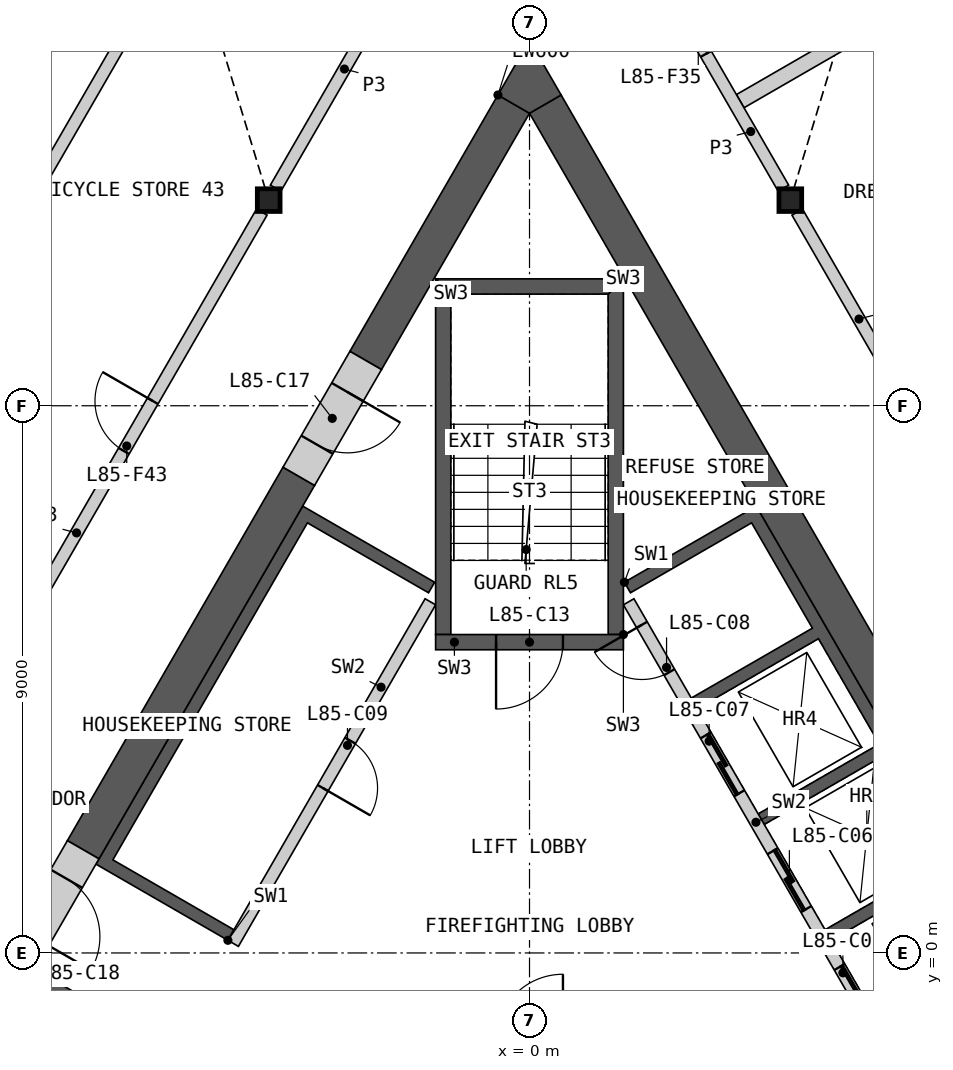
"""IFC4 building model, lengths in metres.
Left out: names, types, materials, properties, quantities, classifications, styles, units other than length and angle.
Written with IfcOpenShell. Run it as: python <this file> out.ifc"""

import sys

from ifc_helpers import new_model, si_unit, direction, frame, frame_2d, origin, origin_2d, place, context, subcontext, project, spatial, polyline, rectangle, i_section, outline, extrude, element, fill, save


model = new_model("IFC4")
c1 = context("Model", 3, precision=1e-05, world=origin(), true_north=direction((0.0, 1.0)))
c2 = subcontext(c1, "Body", "Model", "MODEL_VIEW")
j1 = project(units=[si_unit("LENGTHUNIT", "METRE"), si_unit("PLANEANGLEUNIT", "RADIAN")], contexts=[c1])
p1 = place(None, origin())
s1 = spatial("IfcSite", under=j1, at=p1, CompositionType="ELEMENT")
p2 = place(p1, origin())
s2 = spatial("IfcBuilding", under=s1, at=p2, CompositionType="ELEMENT")
p3 = place(p2, frame((0.0, 0.0, 378.0)))
s3 = spatial("IfcBuildingStorey", under=s2, at=p3, CompositionType="ELEMENT", Elevation=378.0)
for number, where, z_axis, x_axis in (
    (1, (-4.289, 12.382, 0.0), (0.0, 0.0, 1.0), (1.0, 0.0, 0.0)),
    (2, (4.289, 12.382, 0.0), (0.0, 0.0, 1.0), (1.0, 0.0, 0.0)),
):
    element("IfcColumn", number, at=place(p3, frame(where, z_axis=z_axis, x_axis=x_axis)), inside=s3, PredefinedType="COLUMN", context=c2, shape_type="SweptSolid", body=[
        extrude(i_section(OverallWidth=0.374, OverallDepth=0.372, WebThickness=0.016, FlangeThickness=0.026, at=origin_2d()), origin(), (0.0, 0.0, 1.0), 3.4),
    ])
p4 = place(p3, origin())
e3 = element("IfcWall", 3, at=p4, inside=s3, PredefinedType="SHEAR", context=c2, shape_type="SweptSolid", body=[
    extrude(outline(polyline([(1.561, 6.097), (3.731, 7.35), (8.231, -0.444), (6.061, -1.697), (5.96, -1.524), (7.952, -0.374), (6.952, 1.358), (4.96, 0.208), (4.861, 0.381), (6.852, 1.531), (5.852, 3.263), (3.861, 2.113), (3.76, 2.287), (5.752, 3.437), (4.752, 5.169), (2.76, 4.019), (2.66, 4.192), (4.652, 5.342), (3.652, 7.074), (1.66, 5.924), (1.561, 6.097)])), origin(), (0.0, 0.0, 1.0), 3.1),
])
p5 = place(p3, frame((5.817, -1.476, 0.0), z_axis=(0.0, 0.0, 1.0), x_axis=(-0.500002616675, 0.866023893041, 0.0)))
e4 = element("IfcWall", 4, at=p5, inside=s3, PredefinedType="SOLIDWALL", context=c2, shape_type="SweptSolid", body=[
    extrude(rectangle(XDim=8.373, YDim=0.2, at=frame_2d((4.187, 0.0))), origin(), (0.0, 0.0, 1.0), 3.1),
])
p6 = place(p5, frame((0.337, 0.0, 0.0)))
e5 = element("IfcOpeningElement", 5, at=p6, cuts=e4, PredefinedType="OPENING", context=c2, shape_type="SweptSolid", body=[
    extrude(rectangle(XDim=1.1, YDim=2.1, at=frame_2d((0.55, 1.05))), frame((0.0, 0.11, 0.0), z_axis=(0.0, -1.0, 0.0), x_axis=(1.0, 0.0, 0.0)), (0.0, 0.0, 1.0), 0.22),
])
p7 = place(p5, frame((2.537, 0.0, 0.0)))
e6 = element("IfcOpeningElement", 6, at=p7, cuts=e4, PredefinedType="OPENING", context=c2, shape_type="SweptSolid", body=[
    extrude(rectangle(XDim=1.1, YDim=2.1, at=frame_2d((0.55, 1.05))), frame((0.0, 0.11, 0.0), z_axis=(0.0, -1.0, 0.0), x_axis=(1.0, 0.0, 0.0)), (0.0, 0.0, 1.0), 0.22),
])
p8 = place(p5, frame((4.737, 0.0, 0.0)))
e7 = element("IfcOpeningElement", 7, at=p8, cuts=e4, PredefinedType="OPENING", context=c2, shape_type="SweptSolid", body=[
    extrude(rectangle(XDim=1.1, YDim=2.1, at=frame_2d((0.55, 1.05))), frame((0.0, 0.11, 0.0), z_axis=(0.0, -1.0, 0.0), x_axis=(1.0, 0.0, 0.0)), (0.0, 0.0, 1.0), 0.22),
])
p9 = place(p5, frame((7.037, 0.0, 0.0)))
e8 = element("IfcOpeningElement", 8, at=p9, cuts=e4, PredefinedType="OPENING", context=c2, shape_type="SweptSolid", body=[
    extrude(rectangle(XDim=0.9, YDim=2.1, at=frame_2d((0.45, 1.05))), frame((0.0, 0.11, 0.0), z_axis=(0.0, -1.0, 0.0), x_axis=(1.0, 0.0, 0.0)), (0.0, 0.0, 1.0), 0.22),
])
p10 = place(p3, origin())
e9 = element("IfcWall", 9, at=p10, inside=s3, PredefinedType="SHEAR", context=c2, shape_type="SweptSolid", body=[
    extrude(outline(polyline([(-6.061, -1.697), (-8.231, -0.444), (-8.131, -0.271), (-5.96, -1.524), (-6.061, -1.697)])), origin(), (0.0, 0.0, 1.0), 3.1),
])
p11 = place(p3, origin())
e10 = element("IfcWall", 10, at=p11, inside=s3, PredefinedType="SHEAR", context=c2, shape_type="SweptSolid", body=[
    extrude(outline(polyline([(-4.96, 0.208), (-7.131, 1.461), (-3.731, 7.35), (-1.561, 6.097), (-1.66, 5.924), (-3.652, 7.074), (-6.852, 1.531), (-4.861, 0.381), (-4.96, 0.208)])), origin(), (0.0, 0.0, 1.0), 3.1),
])
p12 = place(p3, frame((-1.631, 5.776, 0.0), z_axis=(0.0, 0.0, 1.0), x_axis=(-0.499992876559, -0.866029516466, 0.0)))
e11 = element("IfcWall", 11, at=p12, inside=s3, PredefinedType="SOLIDWALL", context=c2, shape_type="SweptSolid", body=[
    extrude(rectangle(XDim=6.486, YDim=0.2, at=frame_2d((3.243, 0.0))), origin(), (0.0, 0.0, 1.0), 3.1),
])
p13 = place(p12, frame((2.637, 0.0, 0.0)))
e12 = element("IfcOpeningElement", 12, at=p13, cuts=e11, PredefinedType="OPENING", context=c2, shape_type="SweptSolid", body=[
    extrude(rectangle(XDim=0.9, YDim=2.1, at=frame_2d((0.45, 1.05))), frame((0.0, 0.11, 0.0), z_axis=(0.0, -1.0, 0.0), x_axis=(1.0, 0.0, 0.0)), (0.0, 0.0, 1.0), 0.22),
])
p14 = place(p3, origin())
e13 = element("IfcWall", 13, at=p14, inside=s3, PredefinedType="SHEAR", context=c2, shape_type="SweptSolid", body=[
    extrude(outline(polyline([(1.544, 5.237), (1.544, 11.087), (1.294, 10.837), (1.294, 5.237), (1.544, 5.237)])), origin(), (0.0, 0.0, 1.0), 3.1),
])
p15 = place(p3, origin())
e14 = element("IfcWall", 14, at=p15, inside=s3, PredefinedType="SHEAR", context=c2, shape_type="SweptSolid", body=[
    extrude(outline(polyline([(1.544, 11.087), (-1.544, 11.087), (-1.294, 10.837), (1.294, 10.837), (1.544, 11.087)])), origin(), (0.0, 0.0, 1.0), 3.1),
])
p16 = place(p3, origin())
e15 = element("IfcWall", 15, at=p16, inside=s3, PredefinedType="SHEAR", context=c2, shape_type="SweptSolid", body=[
    extrude(outline(polyline([(-1.294, 10.837), (-1.544, 11.087), (-1.544, 5.237), (-1.294, 5.237), (-1.294, 10.837)])), origin(), (0.0, 0.0, 1.0), 3.1),
])
p17 = place(p3, frame((1.544, 5.112, 0.0), z_axis=(0.0, 0.0, 1.0), x_axis=(-1.0, 0.0, 0.0)))
e16 = element("IfcWall", 16, at=p17, inside=s3, PredefinedType="SHEAR", context=c2, shape_type="SweptSolid", body=[
    extrude(rectangle(XDim=3.088, YDim=0.25, at=frame_2d((1.544, 0.0))), origin(), (0.0, 0.0, 1.0), 3.1),
])
p18 = place(p17, frame((0.994, 0.0, 0.0)))
e17 = element("IfcOpeningElement", 17, at=p18, cuts=e16, PredefinedType="OPENING", context=c2, shape_type="SweptSolid", body=[
    extrude(rectangle(XDim=1.1, YDim=2.1, at=frame_2d((0.55, 1.05))), frame((0.0, 0.135, 0.0), z_axis=(0.0, -1.0, 0.0), x_axis=(1.0, 0.0, 0.0)), (0.0, 0.0, 1.0), 0.27),
])
p19 = place(p3, frame((8.686, -0.634, 0.0), z_axis=(0.0, 0.0, 1.0), x_axis=(-0.500004601921, 0.866022746848, 0.0)))
e18 = element("IfcWall", 18, at=p19, inside=s3, PredefinedType="SHEAR", context=c2, shape_type="SweptSolid", body=[
    extrude(rectangle(XDim=16.853, YDim=0.6, at=frame_2d((8.426, 0.0))), origin(), (0.0, 0.0, 1.0), 3.1),
])
p20 = place(p3, frame((-3.794, 7.84, 0.0), z_axis=(0.0, 0.0, 1.0), x_axis=(-0.499974747889, -0.866039982607, 0.0)))
e19 = element("IfcWall", 19, at=p20, inside=s3, PredefinedType="SHEAR", context=c2, shape_type="SweptSolid", body=[
    extrude(rectangle(XDim=7.092, YDim=0.6, at=frame_2d((3.546, 0.0))), origin(), (0.0, 0.0, 1.0), 3.1),
])
p21 = place(p3, frame((-0.26, 13.961, 0.0), z_axis=(0.0, 0.0, 1.0), x_axis=(-0.50000604952, -0.866021911064, 0.0)))
e20 = element("IfcWall", 20, at=p21, inside=s3, PredefinedType="SHEAR", context=c2, shape_type="SweptSolid", body=[
    extrude(rectangle(XDim=4.869, YDim=0.6, at=frame_2d((2.434, 0.0))), origin(), (0.0, 0.0, 1.0), 3.1),
])
p22 = place(p3, origin())
e21 = element("IfcWall", 21, at=p22, inside=s3, PredefinedType="SHEAR", context=c2, shape_type="SweptSolid", body=[
    extrude(outline(polyline([(-0.52, 14.111), (0.0, 15.011), (0.52, 14.111), (0.0, 13.811), (-0.52, 14.111)])), origin(), (0.0, 0.0, 1.0), 3.1),
])
p23 = place(p3, frame((-2.694, 9.745, 0.0), z_axis=(0.0, 0.0, 1.0), x_axis=(-0.50002983664, -0.866008176907, 0.0)))
e22 = element("IfcWall", 22, at=p23, inside=s3, PredefinedType="SHEAR", context=c2, shape_type="SweptSolid", body=[
    extrude(rectangle(XDim=2.2, YDim=0.6, at=frame_2d((1.1, 0.0))), origin(), (0.0, 0.0, 1.0), 3.1),
])
p24 = place(p23, frame((0.6, 0.0, 0.0)))
e23 = element("IfcOpeningElement", 23, at=p24, cuts=e22, PredefinedType="OPENING", context=c2, shape_type="SweptSolid", body=[
    extrude(rectangle(XDim=1.0, YDim=2.1, at=frame_2d((0.5, 1.05))), frame((0.0, 0.31, 0.0), z_axis=(0.0, -1.0, 0.0), x_axis=(1.0, 0.0, 0.0)), (0.0, 0.0, 1.0), 0.62),
])
p25 = place(p3, frame((-7.34, 1.698, 0.0), z_axis=(0.0, 0.0, 1.0), x_axis=(-0.50002983664, -0.866008176907, 0.0)))
e24 = element("IfcWall", 24, at=p25, inside=s3, PredefinedType="SHEAR", context=c2, shape_type="SweptSolid", body=[
    extrude(rectangle(XDim=2.2, YDim=0.6, at=frame_2d((1.1, 0.0))), origin(), (0.0, 0.0, 1.0), 3.1),
])
p26 = place(p25, frame((0.55, 0.0, 0.0)))
e25 = element("IfcOpeningElement", 25, at=p26, cuts=e24, PredefinedType="OPENING", context=c2, shape_type="SweptSolid", body=[
    extrude(rectangle(XDim=1.1, YDim=2.1, at=frame_2d((0.55, 1.05))), frame((0.0, 0.31, 0.0), z_axis=(0.0, -1.0, 0.0), x_axis=(1.0, 0.0, 0.0)), (0.0, 0.0, 1.0), 0.62),
])
p27 = place(p3, frame((3.465, 14.01, 0.0), z_axis=(0.0, 0.0, 1.0), x_axis=(0.866032376801, 0.499987922186, 0.0)))
e26 = element("IfcWall", 26, at=p27, inside=s3, PredefinedType="PARTITIONING", context=c2, shape_type="SweptSolid", body=[
    extrude(rectangle(XDim=11.782, YDim=0.25, at=frame_2d((5.891, 0.0))), origin(), (0.0, 0.0, 1.0), 2.33),
])
p28 = place(p3, frame((4.403, 12.185, 0.0), z_axis=(0.0, 0.0, 1.0), x_axis=(0.499992155518, -0.866029932751, 0.0)))
e27 = element("IfcWall", 27, at=p28, inside=s3, PredefinedType="PARTITIONING", context=c2, shape_type="SweptSolid", body=[
    extrude(rectangle(XDim=8.123, YDim=0.2, at=frame_2d((4.062, 0.0))), origin(), (0.0, 0.0, 1.0), 3.1),
])
p29 = place(p28, frame((3.963, 0.0, 0.0)))
e28 = element("IfcOpeningElement", 28, at=p29, cuts=e27, PredefinedType="OPENING", context=c2, shape_type="SweptSolid", body=[
    extrude(rectangle(XDim=1.0, YDim=2.1, at=frame_2d((0.5, 1.05))), frame((0.0, 0.11, 0.0), z_axis=(0.0, -1.0, 0.0), x_axis=(1.0, 0.0, 0.0)), (0.0, 0.0, 1.0), 0.22),
])
p30 = place(p3, frame((-8.465, 5.15, 0.0), z_axis=(0.0, 0.0, 1.0), x_axis=(0.499992155518, 0.866029932751, 0.0)))
e29 = element("IfcWall", 29, at=p30, inside=s3, PredefinedType="PARTITIONING", context=c2, shape_type="SweptSolid", body=[
    extrude(rectangle(XDim=8.123, YDim=0.2, at=frame_2d((4.062, 0.0))), origin(), (0.0, 0.0, 1.0), 3.1),
])
p31 = place(p30, frame((3.587, 0.0, 0.0)))
e30 = element("IfcOpeningElement", 30, at=p31, cuts=e29, PredefinedType="OPENING", context=c2, shape_type="SweptSolid", body=[
    extrude(rectangle(XDim=0.95, YDim=2.1, at=frame_2d((0.475, 1.05))), frame((0.0, 0.11, 0.0), z_axis=(0.0, -1.0, 0.0), x_axis=(1.0, 0.0, 0.0)), (0.0, 0.0, 1.0), 0.22),
])
p32 = place(p3, frame((-4.176, 12.579, 0.0), z_axis=(0.0, 0.0, 1.0), x_axis=(0.499974648164, 0.866040040179, 0.0)))
e31 = element("IfcWall", 31, at=p32, inside=s3, PredefinedType="PARTITIONING", context=c2, shape_type="SweptSolid", body=[
    extrude(rectangle(XDim=4.525, YDim=0.2, at=frame_2d((2.263, 0.0))), origin(), (0.0, 0.0, 1.0), 3.1),
])
p33 = place(p3, frame((2.025, 16.303, 0.0), z_axis=(0.0, 0.0, 1.0), x_axis=(0.500004215162, -0.866022970146, 0.0)))
e32 = element("IfcWall", 32, at=p33, inside=s3, PredefinedType="PARTITIONING", context=c2, shape_type="SweptSolid", body=[
    extrude(rectangle(XDim=4.3, YDim=0.2, at=frame_2d((2.15, 0.0))), origin(), (0.0, 0.0, 1.0), 3.1),
])
p34 = place(p33, frame((0.75, 0.0, 0.0)))
e33 = element("IfcOpeningElement", 33, at=p34, cuts=e32, PredefinedType="OPENING", context=c2, shape_type="SweptSolid", body=[
    extrude(rectangle(XDim=1.0, YDim=2.1, at=frame_2d((0.5, 1.05))), frame((0.0, 0.11, 0.0), z_axis=(0.0, -1.0, 0.0), x_axis=(1.0, 0.0, 0.0)), (0.0, 0.0, 1.0), 0.22),
])
p35 = place(p3, frame((-11.473, 6.74, 0.0), z_axis=(0.0, 0.0, 1.0), x_axis=(0.500001082559, 0.866024778768, 0.0)))
e34 = element("IfcWall", 34, at=p35, inside=s3, PredefinedType="PARTITIONING", context=c2, shape_type="SweptSolid", body=[
    extrude(rectangle(XDim=15.094, YDim=0.2, at=frame_2d((7.547, 0.0))), origin(), (0.0, 0.0, 1.0), 2.33),
])
p36 = place(p35, frame((10.383, 0.0, 0.0)))
e35 = element("IfcOpeningElement", 35, at=p36, cuts=e34, PredefinedType="OPENING", context=c2, shape_type="SweptSolid", body=[
    extrude(rectangle(XDim=0.95, YDim=2.1, at=frame_2d((0.475, 1.05))), frame((0.0, 0.11, 0.0), z_axis=(0.0, -1.0, 0.0), x_axis=(1.0, 0.0, 0.0)), (0.0, 0.0, 1.0), 0.22),
])
p37 = place(p6, origin())
e36 = element("IfcDoor", 36, at=p37, inside=s3, OperationType="SLIDING_TO_LEFT", PredefinedType="DOOR", context=c2, shape_type="SweptSolid", body=[
    extrude(rectangle(XDim=1.1, YDim=2.1, at=frame_2d((0.55, 1.05))), frame((0.0, 0.025, 0.0), z_axis=(0.0, -1.0, 0.0), x_axis=(1.0, 0.0, 0.0)), (0.0, 0.0, 1.0), 0.05),
])
fill(e5, e36)
p38 = place(p7, origin())
e37 = element("IfcDoor", 37, at=p38, inside=s3, OperationType="SLIDING_TO_LEFT", PredefinedType="DOOR", context=c2, shape_type="SweptSolid", body=[
    extrude(rectangle(XDim=1.1, YDim=2.1, at=frame_2d((0.55, 1.05))), frame((0.0, 0.025, 0.0), z_axis=(0.0, -1.0, 0.0), x_axis=(1.0, 0.0, 0.0)), (0.0, 0.0, 1.0), 0.05),
])
fill(e6, e37)
p39 = place(p8, origin())
e38 = element("IfcDoor", 38, at=p39, inside=s3, OperationType="SLIDING_TO_LEFT", PredefinedType="DOOR", context=c2, shape_type="SweptSolid", body=[
    extrude(rectangle(XDim=1.1, YDim=2.1, at=frame_2d((0.55, 1.05))), frame((0.0, 0.025, 0.0), z_axis=(0.0, -1.0, 0.0), x_axis=(1.0, 0.0, 0.0)), (0.0, 0.0, 1.0), 0.05),
])
fill(e7, e38)
p40 = place(p9, origin())
e39 = element("IfcDoor", 39, at=p40, inside=s3, OperationType="SINGLE_SWING_RIGHT", PredefinedType="DOOR", context=c2, shape_type="SweptSolid", body=[
    extrude(rectangle(XDim=0.9, YDim=2.1, at=frame_2d((0.45, 1.05))), frame((0.0, 0.025, 0.0), z_axis=(0.0, -1.0, 0.0), x_axis=(1.0, 0.0, 0.0)), (0.0, 0.0, 1.0), 0.05),
])
fill(e8, e39)
p41 = place(p13, origin())
e40 = element("IfcDoor", 40, at=p41, inside=s3, OperationType="SINGLE_SWING_RIGHT", PredefinedType="DOOR", context=c2, shape_type="SweptSolid", body=[
    extrude(rectangle(XDim=0.9, YDim=2.1, at=frame_2d((0.45, 1.05))), frame((0.0, 0.025, 0.0), z_axis=(0.0, -1.0, 0.0), x_axis=(1.0, 0.0, 0.0)), (0.0, 0.0, 1.0), 0.05),
])
fill(e12, e40)
p42 = place(p18, origin())
e41 = element("IfcDoor", 41, at=p42, inside=s3, OperationType="SINGLE_SWING_RIGHT", PredefinedType="DOOR", context=c2, shape_type="SweptSolid", body=[
    extrude(rectangle(XDim=1.1, YDim=2.1, at=frame_2d((0.55, 1.05))), frame((0.0, 0.025, 0.0), z_axis=(0.0, -1.0, 0.0), x_axis=(1.0, 0.0, 0.0)), (0.0, 0.0, 1.0), 0.05),
])
fill(e17, e41)
p43 = place(p24, origin())
e42 = element("IfcDoor", 42, at=p43, inside=s3, OperationType="SINGLE_SWING_LEFT", PredefinedType="DOOR", context=c2, shape_type="SweptSolid", body=[
    extrude(rectangle(XDim=1.0, YDim=2.1, at=frame_2d((0.5, 1.05))), frame((0.0, 0.055, 0.0), z_axis=(0.0, -1.0, 0.0), x_axis=(1.0, 0.0, 0.0)), (0.0, 0.0, 1.0), 0.05),
])
fill(e23, e42)
p44 = place(p26, origin())
e43 = element("IfcDoor", 43, at=p44, inside=s3, OperationType="SINGLE_SWING_RIGHT", PredefinedType="DOOR", context=c2, shape_type="SweptSolid", body=[
    extrude(rectangle(XDim=1.1, YDim=2.1, at=frame_2d((0.55, 1.05))), frame((0.0, 0.055, 0.0), z_axis=(0.0, -1.0, 0.0), x_axis=(1.0, 0.0, 0.0)), (0.0, 0.0, 1.0), 0.05),
])
fill(e25, e43)
p45 = place(p34, origin())
e44 = element("IfcDoor", 44, at=p45, inside=s3, OperationType="SINGLE_SWING_RIGHT", PredefinedType="DOOR", context=c2, shape_type="SweptSolid", body=[
    extrude(rectangle(XDim=1.0, YDim=2.1, at=frame_2d((0.5, 1.05))), frame((0.0, 0.025, 0.0), z_axis=(0.0, -1.0, 0.0), x_axis=(1.0, 0.0, 0.0)), (0.0, 0.0, 1.0), 0.05),
])
fill(e33, e44)
p46 = place(p31, origin())
e45 = element("IfcDoor", 45, at=p46, inside=s3, OperationType="SINGLE_SWING_RIGHT", PredefinedType="DOOR", context=c2, shape_type="SweptSolid", body=[
    extrude(rectangle(XDim=0.95, YDim=2.1, at=frame_2d((0.475, 1.05))), frame((0.0, 0.025, 0.0), z_axis=(0.0, -1.0, 0.0), x_axis=(1.0, 0.0, 0.0)), (0.0, 0.0, 1.0), 0.05),
])
fill(e30, e45)
save(model, sys.argv[1])
